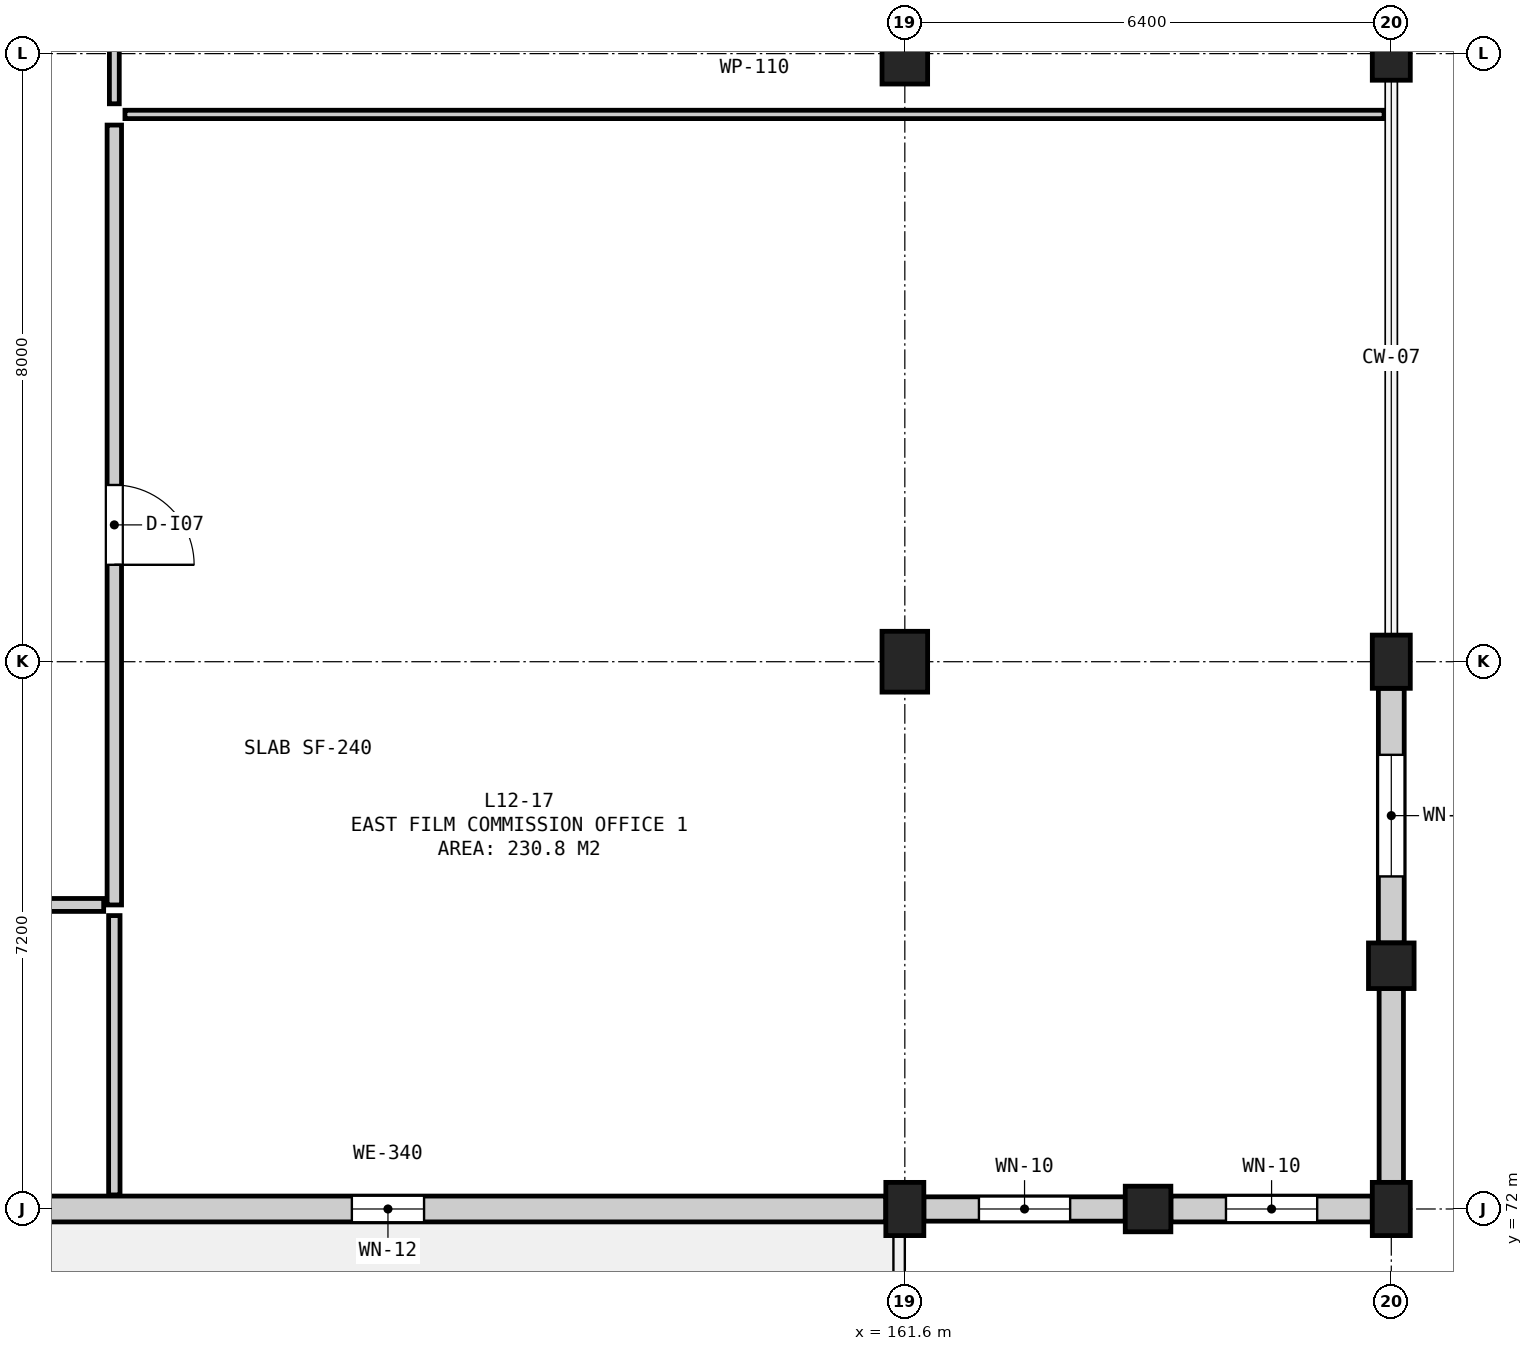
"""IFC4 building model, lengths in metres.
Left out: names, types, materials, properties, quantities, classifications, styles, units other than length and angle.
Written with IfcOpenShell. Run it as: python <this file> out.ifc"""

import sys

from ifc_helpers import new_model, si_unit, direction, frame, frame_2d, origin, origin_2d, place, context, subcontext, project, spatial, rectangle, circle, extrude, element, fill, save


model = new_model("IFC4")
c1 = context("Model", 3, precision=1e-05, world=origin(), true_north=direction((0.0, 1.0)))
c2 = subcontext(c1, "Body", "Model", "MODEL_VIEW")
j1 = project(units=[si_unit("LENGTHUNIT", "METRE"), si_unit("PLANEANGLEUNIT", "RADIAN")], contexts=[c1])
p1 = place(None, origin())
s1 = spatial("IfcSite", under=j1, at=p1, CompositionType="ELEMENT")
p2 = place(p1, origin())
s2 = spatial("IfcBuilding", under=s1, at=p2, CompositionType="ELEMENT")
p3 = place(p2, frame((0.0, 0.0, 50.9)))
s3 = spatial("IfcBuildingStorey", under=s2, at=p3, CompositionType="ELEMENT", Elevation=50.9)
p4 = place(p3, frame((161.6, 72.0, 0.0), z_axis=(0.0, 0.0, 1.0), x_axis=(1.0, 0.0, 0.0)))
e1 = element("IfcColumn", 1, at=p4, inside=s3, PredefinedType="COLUMN", context=c2, shape_type="SweptSolid", body=[
    extrude(rectangle(XDim=0.5, YDim=0.7, at=origin_2d()), origin(), (0.0, 0.0, 1.0), 3.9),
])
for number, where, z_axis, x_axis in (
    (2, (161.6, 79.2, 0.0), (0.0, 0.0, 1.0), (1.0, 0.0, 0.0)),
    (3, (161.6, 87.2, 0.0), (0.0, 0.0, 1.0), (1.0, 0.0, 0.0)),
):
    element("IfcColumn", number, at=place(p3, frame(where, z_axis=z_axis, x_axis=x_axis)), inside=s3, PredefinedType="COLUMN", context=c2, shape_type="SweptSolid", body=[
        extrude(rectangle(XDim=0.6, YDim=0.8, at=origin_2d()), origin(), (0.0, 0.0, 1.0), 3.9),
    ])
p5 = place(p3, frame((164.8, 72.0, 0.0), z_axis=(0.0, 0.0, 1.0), x_axis=(1.0, 0.0, 0.0)))
e4 = element("IfcColumn", 4, at=p5, inside=s3, PredefinedType="COLUMN", context=c2, shape_type="SweptSolid", body=[
    extrude(circle(Radius=0.3, at=origin_2d()), origin(), (0.0, 0.0, 1.0), 3.9),
])
p6 = place(p3, frame((168.0, 72.0, 0.0), z_axis=(0.0, 0.0, 1.0), x_axis=(1.0, 0.0, 0.0)))
e5 = element("IfcColumn", 5, at=p6, inside=s3, PredefinedType="COLUMN", context=c2, shape_type="SweptSolid", body=[
    extrude(rectangle(XDim=0.5, YDim=0.7, at=origin_2d()), origin(), (0.0, 0.0, 1.0), 3.9),
])
p7 = place(p3, frame((168.0, 75.2, 0.0), z_axis=(0.0, 0.0, 1.0), x_axis=(1.0, 0.0, 0.0)))
e6 = element("IfcColumn", 6, at=p7, inside=s3, PredefinedType="COLUMN", context=c2, shape_type="SweptSolid", body=[
    extrude(circle(Radius=0.3, at=origin_2d()), origin(), (0.0, 0.0, 1.0), 3.9),
])
for number, where, z_axis, x_axis in (
    (7, (168.0, 79.2, 0.0), (0.0, 0.0, 1.0), (1.0, 0.0, 0.0)),
    (8, (168.0, 87.2, 0.0), (0.0, 0.0, 1.0), (1.0, 0.0, 0.0)),
):
    element("IfcColumn", number, at=place(p3, frame(where, z_axis=z_axis, x_axis=x_axis)), inside=s3, PredefinedType="COLUMN", context=c2, shape_type="SweptSolid", body=[
        extrude(rectangle(XDim=0.5, YDim=0.7, at=origin_2d()), origin(), (0.0, 0.0, 1.0), 3.9),
    ])
p8 = place(p3, frame((148.25, 72.0, 0.0), z_axis=(0.0, 0.0, 1.0), x_axis=(1.0, 0.0, 0.0)))
e9 = element("IfcWall", 9, at=p8, inside=s3, PredefinedType="SOLIDWALL", context=c2, shape_type="SweptSolid", body=[
    extrude(rectangle(XDim=13.1, YDim=0.34, at=frame_2d((6.55, 0.0))), origin(), (0.0, 0.0, 1.0), 2.645),
])
p9 = place(p8, frame((6.075, 0.0, 0.8)))
e10 = element("IfcOpeningElement", 10, at=p9, cuts=e9, PredefinedType="OPENING", context=c2, shape_type="SweptSolid", body=[
    extrude(rectangle(XDim=0.95, YDim=1.45, at=frame_2d((0.475, 0.725))), frame((0.0, 0.182, 0.0), z_axis=(0.0, -1.0, 0.0), x_axis=(1.0, 0.0, 0.0)), (0.0, 0.0, 1.0), 0.364),
])
p10 = place(p3, frame((161.85, 72.0, 0.0), z_axis=(0.0, 0.0, 1.0), x_axis=(1.0, 0.0, 0.0)))
e11 = element("IfcWall", 11, at=p10, inside=s3, PredefinedType="SOLIDWALL", context=c2, shape_type="SweptSolid", body=[
    extrude(rectangle(XDim=2.65, YDim=0.32, at=frame_2d((1.325, 0.0))), origin(), (0.0, 0.0, 1.0), 3.06),
])
p11 = place(p10, frame((0.725, 0.0, 0.9)))
e12 = element("IfcOpeningElement", 12, at=p11, cuts=e11, PredefinedType="OPENING", context=c2, shape_type="SweptSolid", body=[
    extrude(rectangle(XDim=1.2, YDim=1.7, at=frame_2d((0.6, 0.85))), frame((0.0, 0.172, 0.0), z_axis=(0.0, -1.0, 0.0), x_axis=(1.0, 0.0, 0.0)), (0.0, 0.0, 1.0), 0.344),
])
p12 = place(p3, frame((165.1, 72.0, 0.0), z_axis=(0.0, 0.0, 1.0), x_axis=(1.0, 0.0, 0.0)))
e13 = element("IfcWall", 13, at=p12, inside=s3, PredefinedType="SOLIDWALL", context=c2, shape_type="SweptSolid", body=[
    extrude(rectangle(XDim=2.65, YDim=0.34, at=frame_2d((1.325, 0.0))), origin(), (0.0, 0.0, 1.0), 3.06),
])
p13 = place(p12, frame((0.725, 0.0, 0.9)))
e14 = element("IfcOpeningElement", 14, at=p13, cuts=e13, PredefinedType="OPENING", context=c2, shape_type="SweptSolid", body=[
    extrude(rectangle(XDim=1.2, YDim=1.7, at=frame_2d((0.6, 0.85))), frame((0.0, 0.182, 0.0), z_axis=(0.0, -1.0, 0.0), x_axis=(1.0, 0.0, 0.0)), (0.0, 0.0, 1.0), 0.364),
])
p14 = place(p3, frame((168.0, 72.35, 0.0), z_axis=(0.0, 0.0, 1.0), x_axis=(0.0, 1.0, 0.0)))
e15 = element("IfcWall", 15, at=p14, inside=s3, PredefinedType="SOLIDWALL", context=c2, shape_type="SweptSolid", body=[
    extrude(rectangle(XDim=2.55, YDim=0.32, at=frame_2d((1.275, 0.0))), origin(), (0.0, 0.0, 1.0), 3.06),
])
p15 = place(p3, frame((168.0, 75.5, 0.0), z_axis=(0.0, 0.0, 1.0), x_axis=(0.0, 1.0, 0.0)))
e16 = element("IfcWall", 16, at=p15, inside=s3, PredefinedType="SOLIDWALL", context=c2, shape_type="SweptSolid", body=[
    extrude(rectangle(XDim=3.35, YDim=0.34, at=frame_2d((1.675, 0.0))), origin(), (0.0, 0.0, 1.0), 3.06),
])
p16 = place(p15, frame((0.875, 0.0, 0.9)))
e17 = element("IfcOpeningElement", 17, at=p16, cuts=e16, PredefinedType="OPENING", context=c2, shape_type="SweptSolid", body=[
    extrude(rectangle(XDim=1.6, YDim=1.95, at=frame_2d((0.8, 0.975))), frame((0.0, 0.182, 0.0), z_axis=(0.0, -1.0, 0.0), x_axis=(1.0, 0.0, 0.0)), (0.0, 0.0, 1.0), 0.364),
])
p17 = place(p3, frame((116.985, 76.0, 0.0), z_axis=(0.0, 0.0, 1.0), x_axis=(1.0, 0.0, 0.0)))
e18 = element("IfcWall", 18, at=p17, inside=s3, PredefinedType="PARTITIONING", context=c2, shape_type="SweptSolid", body=[
    extrude(rectangle(XDim=34.075, YDim=0.17, at=frame_2d((17.038, 0.0))), origin(), (0.0, 0.0, 1.0), 3.62),
])
p18 = place(p17, frame((18.49, 0.0, 0.0)))
e19 = element("IfcOpeningElement", 19, at=p18, cuts=e18, PredefinedType="OPENING", context=c2, shape_type="SweptSolid", body=[
    extrude(rectangle(XDim=1.05, YDim=2.15, at=frame_2d((0.525, 1.075))), frame((0.0, 0.097, 0.0), z_axis=(0.0, -1.0, 0.0), x_axis=(1.0, 0.0, 0.0)), (0.0, 0.0, 1.0), 0.194),
])
p19 = place(p3, frame((151.2, 72.185, 0.0), z_axis=(0.0, 0.0, 1.0), x_axis=(0.0, 1.0, 0.0)))
e20 = element("IfcWall", 20, at=p19, inside=s3, PredefinedType="PARTITIONING", context=c2, shape_type="SweptSolid", body=[
    extrude(rectangle(XDim=3.675, YDim=0.15, at=frame_2d((1.837, 0.0))), origin(), (0.0, 0.0, 1.0), 3.62),
])
p20 = place(p3, frame((151.34, 86.4, 0.0), z_axis=(0.0, 0.0, 1.0), x_axis=(1.0, 0.0, 0.0)))
e21 = element("IfcWall", 21, at=p20, inside=s3, PredefinedType="PARTITIONING", context=c2, shape_type="SweptSolid", body=[
    extrude(rectangle(XDim=16.565, YDim=0.11, at=frame_2d((8.282, 0.0))), origin(), (0.0, 0.0, 1.0), 3.62),
])
p21 = place(p3, frame((151.2, 76.0, 0.0), z_axis=(0.0, 0.0, 1.0), x_axis=(0.0, 1.0, 0.0)))
e22 = element("IfcWall", 22, at=p21, inside=s3, PredefinedType="PARTITIONING", context=c2, shape_type="SweptSolid", body=[
    extrude(rectangle(XDim=10.26, YDim=0.19, at=frame_2d((5.13, 0.0))), origin(), (0.0, 0.0, 1.0), 3.62),
])
p22 = place(p21, frame((4.475, 0.0, 0.0)))
e23 = element("IfcOpeningElement", 23, at=p22, cuts=e22, PredefinedType="OPENING", context=c2, shape_type="SweptSolid", body=[
    extrude(rectangle(XDim=1.05, YDim=2.15, at=frame_2d((0.525, 1.075))), frame((0.0, 0.107, 0.0), z_axis=(0.0, -1.0, 0.0), x_axis=(1.0, 0.0, 0.0)), (0.0, 0.0, 1.0), 0.214),
])
p23 = place(p3, frame((151.2, 86.54, 0.0), z_axis=(0.0, 0.0, 1.0), x_axis=(0.0, 1.0, 0.0)))
e24 = element("IfcWall", 24, at=p23, inside=s3, PredefinedType="PARTITIONING", context=c2, shape_type="SweptSolid", body=[
    extrude(rectangle(XDim=11.72, YDim=0.13, at=frame_2d((5.86, 0.0))), origin(), (0.0, 0.0, 1.0), 3.62),
])
p24 = place(p23, frame((5.135, 0.0, 0.0)))
e25 = element("IfcOpeningElement", 25, at=p24, cuts=e24, PredefinedType="OPENING", context=c2, shape_type="SweptSolid", body=[
    extrude(rectangle(XDim=1.05, YDim=2.15, at=frame_2d((0.525, 1.075))), frame((0.0, 0.077, 0.0), z_axis=(0.0, -1.0, 0.0), x_axis=(1.0, 0.0, 0.0)), (0.0, 0.0, 1.0), 0.154),
])
p25 = place(p9, origin())
e26 = element("IfcWindow", 26, at=p25, inside=s3, PartitioningType="SINGLE_PANEL", PredefinedType="WINDOW", context=c2, shape_type="SweptSolid", body=[
    extrude(rectangle(XDim=0.95, YDim=1.45, at=frame_2d((0.475, 0.725))), frame((0.0, 0.03, 0.0), z_axis=(0.0, -1.0, 0.0), x_axis=(1.0, 0.0, 0.0)), (0.0, 0.0, 1.0), 0.06),
])
fill(e10, e26)
p26 = place(p11, origin())
e27 = element("IfcWindow", 27, at=p26, inside=s3, PartitioningType="SINGLE_PANEL", PredefinedType="WINDOW", context=c2, shape_type="SweptSolid", body=[
    extrude(rectangle(XDim=1.2, YDim=1.7, at=frame_2d((0.6, 0.85))), frame((0.0, 0.03, 0.0), z_axis=(0.0, -1.0, 0.0), x_axis=(1.0, 0.0, 0.0)), (0.0, 0.0, 1.0), 0.06),
])
fill(e12, e27)
p27 = place(p13, origin())
e28 = element("IfcWindow", 28, at=p27, inside=s3, PartitioningType="SINGLE_PANEL", PredefinedType="WINDOW", context=c2, shape_type="SweptSolid", body=[
    extrude(rectangle(XDim=1.2, YDim=1.7, at=frame_2d((0.6, 0.85))), frame((0.0, 0.03, 0.0), z_axis=(0.0, -1.0, 0.0), x_axis=(1.0, 0.0, 0.0)), (0.0, 0.0, 1.0), 0.06),
])
fill(e14, e28)
p28 = place(p16, origin())
e29 = element("IfcWindow", 29, at=p28, inside=s3, PartitioningType="DOUBLE_PANEL_VERTICAL", PredefinedType="WINDOW", context=c2, shape_type="SweptSolid", body=[
    extrude(rectangle(XDim=1.6, YDim=1.95, at=frame_2d((0.8, 0.975))), frame((0.0, 0.03, 0.0), z_axis=(0.0, -1.0, 0.0), x_axis=(1.0, 0.0, 0.0)), (0.0, 0.0, 1.0), 0.06),
])
fill(e17, e29)
p29 = place(p22, frame((1.05, 0.0, 0.0), z_axis=(0.0, 0.0, 1.0), x_axis=(-1.0, 0.0, 0.0)))
e30 = element("IfcDoor", 30, at=p29, inside=s3, OperationType="SINGLE_SWING_RIGHT", PredefinedType="DOOR", context=c2, shape_type="SweptSolid", body=[
    extrude(rectangle(XDim=1.05, YDim=2.15, at=frame_2d((0.525, 1.075))), frame((0.0, 0.025, 0.0), z_axis=(0.0, -1.0, 0.0), x_axis=(1.0, 0.0, 0.0)), (0.0, 0.0, 1.0), 0.05),
])
fill(e23, e30)
save(model, sys.argv[1])
